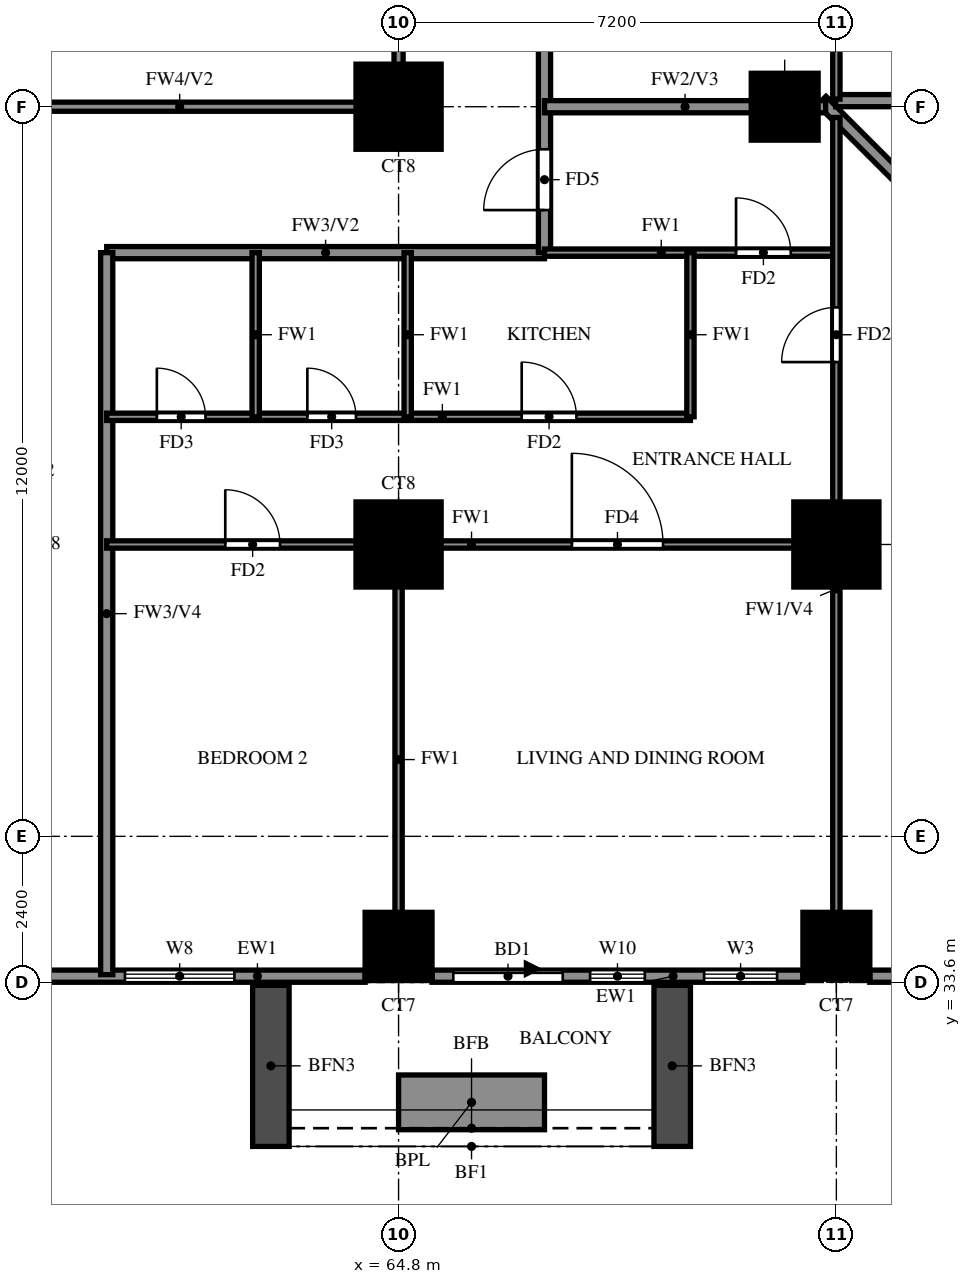
"""IFC4 building model, lengths in metres.
Left out: names, types, materials, properties, quantities, classifications, styles, units other than length and angle.
Written with IfcOpenShell. Run it as: python <this file> out.ifc"""

import sys

from ifc_helpers import new_model, si_unit, direction, frame, frame_2d, origin, origin_2d, place, context, subcontext, project, spatial, rectangle, extrude, source, transform, mapped, element, fill, save


model = new_model("IFC4")
c1 = context("Model", 3, precision=1e-05, world=origin(), true_north=direction((0.0, 1.0)))
c2 = subcontext(c1, "Body", "Model", "MODEL_VIEW")
j1 = project(units=[si_unit("LENGTHUNIT", "METRE"), si_unit("PLANEANGLEUNIT", "RADIAN")], contexts=[c1])
p1 = place(None, origin())
s1 = spatial("IfcSite", under=j1, at=p1, CompositionType="ELEMENT")
p2 = place(p1, origin())
s2 = spatial("IfcBuilding", under=s1, at=p2, CompositionType="ELEMENT")
p3 = place(p2, frame((0.0, 0.0, 41.0)))
s3 = spatial("IfcBuildingStorey", under=s2, at=p3, CompositionType="ELEMENT", Elevation=41.0)
m1 = source(origin(), c2, "Body", "SweptSolid", [
    extrude(rectangle(XDim=1.1, YDim=1.1, at=origin_2d()), origin(), (0.0, 0.0, 1.0), 3.18),
])
for number, where, z_axis, x_axis in (
    (1, (64.8, 34.2, 0.0), (0.0, 0.0, 1.0), (1.0, 0.0, 0.0)),
    (2, (72.0, 34.2, 0.0), (0.0, 0.0, 1.0), (1.0, 0.0, 0.0)),
):
    element("IfcColumn", number, at=place(p3, frame(where, z_axis=z_axis, x_axis=x_axis)), inside=s3, PredefinedType="COLUMN", context=c2, shape_type="MappedRepresentation", body=[
        mapped(m1, transform((0.0, 0.0, 0.0))),
    ])
m2 = source(origin(), c2, "Body", "SweptSolid", [
    extrude(rectangle(XDim=1.4, YDim=1.4, at=origin_2d()), origin(), (0.0, 0.0, 1.0), 3.18),
])
for number, where, z_axis, x_axis in (
    (3, (64.8, 40.8, 0.0), (0.0, 0.0, 1.0), (1.0, 0.0, 0.0)),
    (4, (72.0, 40.8, 0.0), (0.0, 0.0, 1.0), (1.0, 0.0, 0.0)),
    (5, (64.8, 48.0, 0.0), (0.0, 0.0, 1.0), (1.0, 0.0, 0.0)),
):
    element("IfcColumn", number, at=place(p3, frame(where, z_axis=z_axis, x_axis=x_axis)), inside=s3, PredefinedType="COLUMN", context=c2, shape_type="MappedRepresentation", body=[
        mapped(m2, transform((0.0, 0.0, 0.0))),
    ])
p4 = place(p3, frame((71.15, 48.0, 0.0), z_axis=(0.0, 0.0, 1.0), x_axis=(1.0, 0.0, 0.0)))
e6 = element("IfcColumn", 6, at=p4, inside=s3, PredefinedType="COLUMN", context=c2, shape_type="MappedRepresentation", body=[
    mapped(m1, transform((0.0, 0.0, 0.0))),
])
p5 = place(p3, frame((78.74, 41.118, 0.0), z_axis=(0.0, 0.0, 1.0), x_axis=(-0.707106781187, 0.707106781187, 0.0)))
e7 = element("IfcWall", 7, at=p5, inside=s3, PredefinedType="SOLIDWALL", context=c2, shape_type="SweptSolid", body=[
    extrude(rectangle(XDim=9.874, YDim=0.2, at=frame_2d((4.937, 0.0))), origin(), (0.0, 0.0, 1.0), 3.18),
])
p6 = place(p3, frame((71.989, 48.1, 0.0), z_axis=(0.0, 0.0, 1.0), x_axis=(1.0, 0.0, 0.0)))
e8 = element("IfcWall", 8, at=p6, inside=s3, PredefinedType="SOLIDWALL", context=c2, shape_type="SweptSolid", body=[
    extrude(rectangle(XDim=6.511, YDim=0.2, at=frame_2d((3.256, 0.0))), origin(), (0.0, 0.0, 1.0), 3.18),
])
p7 = place(p6, frame((2.206, 0.0, 1.5)))
e9 = element("IfcOpeningElement", 9, at=p7, cuts=e8, PredefinedType="OPENING", context=c2, shape_type="SweptSolid", body=[
    extrude(rectangle(XDim=0.9, YDim=0.9, at=frame_2d((0.45, 0.45))), frame((0.0, 0.11, 0.0), z_axis=(0.0, -1.0, 0.0), x_axis=(1.0, 0.0, 0.0)), (0.0, 0.0, 1.0), 0.22),
])
p8 = place(p3, frame((58.8, 33.7, 0.0), z_axis=(0.0, 0.0, 1.0), x_axis=(1.0, 0.0, 0.0)))
e10 = element("IfcWall", 10, at=p8, inside=s3, PredefinedType="SOLIDWALL", context=c2, shape_type="SweptSolid", body=[
    extrude(rectangle(XDim=5.45, YDim=0.2, at=frame_2d((2.725, 0.0))), origin(), (0.0, 0.0, 1.0), 3.18),
])
p9 = place(p8, frame((1.5, 0.0, 0.6)))
e11 = element("IfcOpeningElement", 11, at=p9, cuts=e10, PredefinedType="OPENING", context=c2, shape_type="SweptSolid", body=[
    extrude(rectangle(XDim=1.8, YDim=2.4, at=frame_2d((0.9, 1.2))), frame((0.0, 0.11, 0.0), z_axis=(0.0, -1.0, 0.0), x_axis=(1.0, 0.0, 0.0)), (0.0, 0.0, 1.0), 0.22),
])
p10 = place(p3, frame((65.35, 33.7, 0.0), z_axis=(0.0, 0.0, 1.0), x_axis=(1.0, 0.0, 0.0)))
e12 = element("IfcWall", 12, at=p10, inside=s3, PredefinedType="SOLIDWALL", context=c2, shape_type="SweptSolid", body=[
    extrude(rectangle(XDim=6.1, YDim=0.2, at=frame_2d((3.05, 0.0))), origin(), (0.0, 0.0, 1.0), 3.18),
])
p11 = place(p10, frame((0.35, 0.0, 0.0)))
e13 = element("IfcOpeningElement", 13, at=p11, cuts=e12, PredefinedType="OPENING", context=c2, shape_type="SweptSolid", body=[
    extrude(rectangle(XDim=1.8, YDim=2.4, at=frame_2d((0.9, 1.2))), frame((0.0, 0.11, 0.0), z_axis=(0.0, -1.0, 0.0), x_axis=(1.0, 0.0, 0.0)), (0.0, 0.0, 1.0), 0.22),
])
p12 = place(p10, frame((2.6, 0.0, 0.6)))
e14 = element("IfcOpeningElement", 14, at=p12, cuts=e12, PredefinedType="OPENING", context=c2, shape_type="SweptSolid", body=[
    extrude(rectangle(XDim=0.9, YDim=2.4, at=frame_2d((0.45, 1.2))), frame((0.0, 0.11, 0.0), z_axis=(0.0, -1.0, 0.0), x_axis=(1.0, 0.0, 0.0)), (0.0, 0.0, 1.0), 0.22),
])
p13 = place(p10, frame((4.475, 0.0, 0.6)))
e15 = element("IfcOpeningElement", 15, at=p13, cuts=e12, PredefinedType="OPENING", context=c2, shape_type="SweptSolid", body=[
    extrude(rectangle(XDim=1.2, YDim=2.4, at=frame_2d((0.6, 1.2))), frame((0.0, 0.11, 0.0), z_axis=(0.0, -1.0, 0.0), x_axis=(1.0, 0.0, 0.0)), (0.0, 0.0, 1.0), 0.22),
])
p14 = place(p3, frame((72.55, 33.7, 0.0), z_axis=(0.0, 0.0, 1.0), x_axis=(1.0, 0.0, 0.0)))
e16 = element("IfcWall", 16, at=p14, inside=s3, PredefinedType="SOLIDWALL", context=c2, shape_type="SweptSolid", body=[
    extrude(rectangle(XDim=10.85, YDim=0.2, at=frame_2d((5.425, 0.0))), origin(), (0.0, 0.0, 1.0), 3.18),
])
p15 = place(p14, frame((5.75, 0.0, 0.0)))
e17 = element("IfcOpeningElement", 17, at=p15, cuts=e16, PredefinedType="OPENING", context=c2, shape_type="SweptSolid", body=[
    extrude(rectangle(XDim=1.8, YDim=2.4, at=frame_2d((0.9, 1.2))), frame((0.0, 0.11, 0.0), z_axis=(0.0, -1.0, 0.0), x_axis=(1.0, 0.0, 0.0)), (0.0, 0.0, 1.0), 0.22),
])
p16 = place(p14, frame((1.025, 0.0, 0.6)))
e18 = element("IfcOpeningElement", 18, at=p16, cuts=e16, PredefinedType="OPENING", context=c2, shape_type="SweptSolid", body=[
    extrude(rectangle(XDim=2.4, YDim=2.4, at=frame_2d((1.2, 1.2))), frame((0.0, 0.11, 0.0), z_axis=(0.0, -1.0, 0.0), x_axis=(1.0, 0.0, 0.0)), (0.0, 0.0, 1.0), 0.22),
])
p17 = place(p14, frame((8.35, 0.0, 0.6)))
e19 = element("IfcOpeningElement", 19, at=p17, cuts=e16, PredefinedType="OPENING", context=c2, shape_type="SweptSolid", body=[
    extrude(rectangle(XDim=1.8, YDim=2.4, at=frame_2d((0.9, 1.2))), frame((0.0, 0.11, 0.0), z_axis=(0.0, -1.0, 0.0), x_axis=(1.0, 0.0, 0.0)), (0.0, 0.0, 1.0), 0.22),
])
for number, where, z_axis, x_axis in (
    (20, (62.7, 33.55, 0.0), (0.0, 0.0, 1.0), (0.0, -1.0, 0.0)),
    (21, (69.3, 33.55, 0.0), (0.0, 0.0, 1.0), (0.0, -1.0, 0.0)),
):
    element("IfcWall", number, at=place(p3, frame(where, z_axis=z_axis, x_axis=x_axis)), inside=s3, PredefinedType="SOLIDWALL", context=c2, shape_type="SweptSolid", body=[
        extrude(rectangle(XDim=2.65, YDim=0.6, at=frame_2d((1.325, 0.0))), origin(), (0.0, 0.0, 1.0), 2.85),
    ])
p18 = place(p3, frame((64.8, 31.625, 0.0), z_axis=(0.0, 0.0, 1.0), x_axis=(1.0, 0.0, 0.0)))
e22 = element("IfcWall", 22, at=p18, inside=s3, PredefinedType="SOLIDWALL", context=c2, shape_type="SweptSolid", body=[
    extrude(rectangle(XDim=2.4, YDim=0.9, at=frame_2d((1.2, 0.0))), origin(), (0.0, 0.0, 1.0), 0.9),
])
p19 = place(p3, frame((60.0, 45.6, 0.0), z_axis=(0.0, 0.0, 1.0), x_axis=(1.0, 0.0, 0.0)))
e23 = element("IfcWall", 23, at=p19, inside=s3, PredefinedType="SOLIDWALL", context=c2, shape_type="SweptSolid", body=[
    extrude(rectangle(XDim=7.2, YDim=0.2, at=frame_2d((3.6, 0.0))), origin(), (0.0, 0.0, 1.0), 3.18),
])
p20 = place(p3, frame((60.0, 33.725, 0.0), z_axis=(0.0, 0.0, 1.0), x_axis=(0.0, 1.0, 0.0)))
e24 = element("IfcWall", 24, at=p20, inside=s3, PredefinedType="SOLIDWALL", context=c2, shape_type="SweptSolid", body=[
    extrude(rectangle(XDim=11.875, YDim=0.2, at=frame_2d((5.938, 0.0))), origin(), (0.0, 0.0, 1.0), 2.28),
])
p21 = place(p3, frame((67.2, 45.6, 0.0), z_axis=(0.0, 0.0, 1.0), x_axis=(0.0, 1.0, 0.0)))
e25 = element("IfcWall", 25, at=p21, inside=s3, PredefinedType="SOLIDWALL", context=c2, shape_type="SweptSolid", body=[
    extrude(rectangle(XDim=12.0, YDim=0.2, at=frame_2d((6.0, 0.0))), origin(), (0.0, 0.0, 1.0), 3.18),
])
p22 = place(p21, frame((10.3, 0.0, 0.0)))
e26 = element("IfcOpeningElement", 26, at=p22, cuts=e25, PredefinedType="OPENING", context=c2, shape_type="SweptSolid", body=[
    extrude(rectangle(XDim=1.0, YDim=2.1, at=frame_2d((0.5, 1.05))), frame((0.0, 0.11, 0.0), z_axis=(0.0, -1.0, 0.0), x_axis=(1.0, 0.0, 0.0)), (0.0, 0.0, 1.0), 0.22),
])
p23 = place(p21, frame((0.7, 0.0, 0.0)))
e27 = element("IfcOpeningElement", 27, at=p23, cuts=e25, PredefinedType="OPENING", context=c2, shape_type="SweptSolid", body=[
    extrude(rectangle(XDim=1.0, YDim=2.1, at=frame_2d((0.5, 1.05))), frame((0.0, 0.11, 0.0), z_axis=(0.0, -1.0, 0.0), x_axis=(1.0, 0.0, 0.0)), (0.0, 0.0, 1.0), 0.22),
])
p24 = place(p3, frame((67.2, 48.0, 0.0), z_axis=(0.0, 0.0, 1.0), x_axis=(1.0, 0.0, 0.0)))
e28 = element("IfcWall", 28, at=p24, inside=s3, PredefinedType="SOLIDWALL", context=c2, shape_type="SweptSolid", body=[
    extrude(rectangle(XDim=4.623, YDim=0.2, at=frame_2d((2.312, 0.0))), origin(), (0.0, 0.0, 1.0), 3.18),
])
p25 = place(p3, frame((60.0, 40.8, 0.0), z_axis=(0.0, 0.0, 1.0), x_axis=(1.0, 0.0, 0.0)))
e29 = element("IfcWall", 29, at=p25, inside=s3, PredefinedType="PARTITIONING", context=c2, shape_type="SweptSolid", body=[
    extrude(rectangle(XDim=12.0, YDim=0.12, at=frame_2d((6.0, 0.0))), origin(), (0.0, 0.0, 1.0), 3.18),
])
p26 = place(p25, frame((7.65, 0.0, 0.0)))
e30 = element("IfcOpeningElement", 30, at=p26, cuts=e29, PredefinedType="OPENING", context=c2, shape_type="SweptSolid", body=[
    extrude(rectangle(XDim=1.5, YDim=2.1, at=frame_2d((0.75, 1.05))), frame((0.0, 0.07, 0.0), z_axis=(0.0, -1.0, 0.0), x_axis=(1.0, 0.0, 0.0)), (0.0, 0.0, 1.0), 0.14),
])
p27 = place(p25, frame((1.95, 0.0, 0.0)))
e31 = element("IfcOpeningElement", 31, at=p27, cuts=e29, PredefinedType="OPENING", context=c2, shape_type="SweptSolid", body=[
    extrude(rectangle(XDim=0.9, YDim=2.1, at=frame_2d((0.45, 1.05))), frame((0.0, 0.07, 0.0), z_axis=(0.0, -1.0, 0.0), x_axis=(1.0, 0.0, 0.0)), (0.0, 0.0, 1.0), 0.14),
])
p28 = place(p3, frame((60.0, 42.9, 0.0), z_axis=(0.0, 0.0, 1.0), x_axis=(1.0, 0.0, 0.0)))
e32 = element("IfcWall", 32, at=p28, inside=s3, PredefinedType="PARTITIONING", context=c2, shape_type="SweptSolid", body=[
    extrude(rectangle(XDim=9.6, YDim=0.12, at=frame_2d((4.8, 0.0))), origin(), (0.0, 0.0, 1.0), 3.18),
])
p29 = place(p28, frame((6.825, 0.0, 0.0)))
e33 = element("IfcOpeningElement", 33, at=p29, cuts=e32, PredefinedType="OPENING", context=c2, shape_type="SweptSolid", body=[
    extrude(rectangle(XDim=0.9, YDim=2.1, at=frame_2d((0.45, 1.05))), frame((0.0, 0.07, 0.0), z_axis=(0.0, -1.0, 0.0), x_axis=(1.0, 0.0, 0.0)), (0.0, 0.0, 1.0), 0.14),
])
p30 = place(p28, frame((3.3, 0.0, 0.0)))
e34 = element("IfcOpeningElement", 34, at=p30, cuts=e32, PredefinedType="OPENING", context=c2, shape_type="SweptSolid", body=[
    extrude(rectangle(XDim=0.8, YDim=2.1, at=frame_2d((0.4, 1.05))), frame((0.0, 0.07, 0.0), z_axis=(0.0, -1.0, 0.0), x_axis=(1.0, 0.0, 0.0)), (0.0, 0.0, 1.0), 0.14),
])
p31 = place(p28, frame((0.825, 0.0, 0.0)))
e35 = element("IfcOpeningElement", 35, at=p31, cuts=e32, PredefinedType="OPENING", context=c2, shape_type="SweptSolid", body=[
    extrude(rectangle(XDim=0.8, YDim=2.1, at=frame_2d((0.4, 1.05))), frame((0.0, 0.07, 0.0), z_axis=(0.0, -1.0, 0.0), x_axis=(1.0, 0.0, 0.0)), (0.0, 0.0, 1.0), 0.14),
])
p32 = place(p3, frame((67.2, 45.6, 0.0), z_axis=(0.0, 0.0, 1.0), x_axis=(1.0, 0.0, 0.0)))
e36 = element("IfcWall", 36, at=p32, inside=s3, PredefinedType="PARTITIONING", context=c2, shape_type="SweptSolid", body=[
    extrude(rectangle(XDim=4.8, YDim=0.12, at=frame_2d((2.4, 0.0))), origin(), (0.0, 0.0, 1.0), 3.18),
])
p33 = place(p32, frame((3.15, 0.0, 0.0)))
e37 = element("IfcOpeningElement", 37, at=p33, cuts=e36, PredefinedType="OPENING", context=c2, shape_type="SweptSolid", body=[
    extrude(rectangle(XDim=0.9, YDim=2.1, at=frame_2d((0.45, 1.05))), frame((0.0, 0.07, 0.0), z_axis=(0.0, -1.0, 0.0), x_axis=(1.0, 0.0, 0.0)), (0.0, 0.0, 1.0), 0.14),
])
p34 = place(p3, frame((62.45, 42.9, 0.0), z_axis=(0.0, 0.0, 1.0), x_axis=(0.0, 1.0, 0.0)))
e38 = element("IfcWall", 38, at=p34, inside=s3, PredefinedType="PARTITIONING", context=c2, shape_type="SweptSolid", body=[
    extrude(rectangle(XDim=2.7, YDim=0.12, at=frame_2d((1.35, 0.0))), origin(), (0.0, 0.0, 1.0), 3.18),
])
p35 = place(p3, frame((64.8, 33.725, 0.0), z_axis=(0.0, 0.0, 1.0), x_axis=(0.0, 1.0, 0.0)))
e39 = element("IfcWall", 39, at=p35, inside=s3, PredefinedType="PARTITIONING", context=c2, shape_type="SweptSolid", body=[
    extrude(rectangle(XDim=7.075, YDim=0.12, at=frame_2d((3.538, 0.0))), origin(), (0.0, 0.0, 1.0), 3.18),
])
for number, where, z_axis, x_axis in (
    (40, (64.95, 42.9, 0.0), (0.0, 0.0, 1.0), (0.0, 1.0, 0.0)),
    (41, (69.6, 42.9, 0.0), (0.0, 0.0, 1.0), (0.0, 1.0, 0.0)),
):
    element("IfcWall", number, at=place(p3, frame(where, z_axis=z_axis, x_axis=x_axis)), inside=s3, PredefinedType="PARTITIONING", context=c2, shape_type="SweptSolid", body=[
        extrude(rectangle(XDim=2.7, YDim=0.12, at=frame_2d((1.35, 0.0))), origin(), (0.0, 0.0, 1.0), 3.18),
    ])
p36 = place(p3, frame((72.0, 33.725, 0.0), z_axis=(0.0, 0.0, 1.0), x_axis=(0.0, 1.0, 0.0)))
e42 = element("IfcWall", 42, at=p36, inside=s3, PredefinedType="PARTITIONING", context=c2, shape_type="SweptSolid", body=[
    extrude(rectangle(XDim=14.098, YDim=0.12, at=frame_2d((7.049, 0.0))), origin(), (0.0, 0.0, 1.0), 2.28),
])
p37 = place(p36, frame((10.075, 0.0, 0.0)))
e43 = element("IfcOpeningElement", 43, at=p37, cuts=e42, PredefinedType="OPENING", context=c2, shape_type="SweptSolid", body=[
    extrude(rectangle(XDim=0.9, YDim=2.1, at=frame_2d((0.45, 1.05))), frame((0.0, 0.07, 0.0), z_axis=(0.0, -1.0, 0.0), x_axis=(1.0, 0.0, 0.0)), (0.0, 0.0, 1.0), 0.14),
])
p38 = place(p3, frame((72.0, 48.125, 0.0), z_axis=(0.0, 0.0, 1.0), x_axis=(0.0, 1.0, 0.0)))
e44 = element("IfcWall", 44, at=p38, inside=s3, PredefinedType="PARTITIONING", context=c2, shape_type="SweptSolid", body=[
    extrude(rectangle(XDim=7.075, YDim=0.12, at=frame_2d((3.538, 0.0))), origin(), (0.0, 0.0, 1.0), 3.18),
])
p39 = place(p3, frame((57.6, 48.0, 0.0), z_axis=(0.0, 0.0, 1.0), x_axis=(1.0, 0.0, 0.0)))
e45 = element("IfcWall", 45, at=p39, inside=s3, PredefinedType="SOLIDWALL", context=c2, shape_type="SweptSolid", body=[
    extrude(rectangle(XDim=7.2, YDim=0.15, at=frame_2d((3.6, 0.0))), origin(), (0.0, 0.0, 1.0), 2.28),
])
p40 = place(p3, frame((64.8, 48.0, 0.0), z_axis=(0.0, 0.0, 1.0), x_axis=(0.0, 1.0, 0.0)))
e46 = element("IfcWall", 46, at=p40, inside=s3, PredefinedType="SOLIDWALL", context=c2, shape_type="SweptSolid", body=[
    extrude(rectangle(XDim=14.4, YDim=0.15, at=frame_2d((7.2, 0.0))), origin(), (0.0, 0.0, 1.0), 2.28),
])
p41 = place(p9, origin())
e47 = element("IfcWindow", 47, at=p41, inside=s3, PartitioningType="DOUBLE_PANEL_VERTICAL", PredefinedType="WINDOW", context=c2, shape_type="SweptSolid", body=[
    extrude(rectangle(XDim=1.8, YDim=2.4, at=frame_2d((0.9, 1.2))), frame((0.0, 0.03, 0.0), z_axis=(0.0, -1.0, 0.0), x_axis=(1.0, 0.0, 0.0)), (0.0, 0.0, 1.0), 0.06),
])
fill(e11, e47)
p42 = place(p11, origin())
e48 = element("IfcDoor", 48, at=p42, inside=s3, OperationType="DOUBLE_DOOR_SLIDING", PredefinedType="DOOR", context=c2, shape_type="SweptSolid", body=[
    extrude(rectangle(XDim=1.8, YDim=2.4, at=frame_2d((0.9, 1.2))), frame((0.0, 0.025, 0.0), z_axis=(0.0, -1.0, 0.0), x_axis=(1.0, 0.0, 0.0)), (0.0, 0.0, 1.0), 0.05),
])
fill(e13, e48)
p43 = place(p12, origin())
e49 = element("IfcWindow", 49, at=p43, inside=s3, PartitioningType="SINGLE_PANEL", PredefinedType="WINDOW", context=c2, shape_type="SweptSolid", body=[
    extrude(rectangle(XDim=0.9, YDim=2.4, at=frame_2d((0.45, 1.2))), frame((0.0, 0.03, 0.0), z_axis=(0.0, -1.0, 0.0), x_axis=(1.0, 0.0, 0.0)), (0.0, 0.0, 1.0), 0.06),
])
fill(e14, e49)
p44 = place(p13, origin())
e50 = element("IfcWindow", 50, at=p44, inside=s3, PartitioningType="SINGLE_PANEL", PredefinedType="WINDOW", context=c2, shape_type="SweptSolid", body=[
    extrude(rectangle(XDim=1.2, YDim=2.4, at=frame_2d((0.6, 1.2))), frame((0.0, 0.03, 0.0), z_axis=(0.0, -1.0, 0.0), x_axis=(1.0, 0.0, 0.0)), (0.0, 0.0, 1.0), 0.06),
])
fill(e15, e50)
p45 = place(p33, origin())
e51 = element("IfcDoor", 51, at=p45, inside=s3, OperationType="SINGLE_SWING_LEFT", PredefinedType="DOOR", context=c2, shape_type="SweptSolid", body=[
    extrude(rectangle(XDim=0.9, YDim=2.1, at=frame_2d((0.45, 1.05))), frame((0.0, 0.025, 0.0), z_axis=(0.0, -1.0, 0.0), x_axis=(1.0, 0.0, 0.0)), (0.0, 0.0, 1.0), 0.05),
])
fill(e37, e51)
p46 = place(p23, origin())
e52 = element("IfcDoor", 52, at=p46, inside=s3, OperationType="SINGLE_SWING_RIGHT", PredefinedType="DOOR", context=c2, shape_type="SweptSolid", body=[
    extrude(rectangle(XDim=1.0, YDim=2.1, at=frame_2d((0.5, 1.05))), frame((0.0, 0.025, 0.0), z_axis=(0.0, -1.0, 0.0), x_axis=(1.0, 0.0, 0.0)), (0.0, 0.0, 1.0), 0.05),
])
fill(e27, e52)
p47 = place(p26, origin())
e53 = element("IfcDoor", 53, at=p47, inside=s3, OperationType="SINGLE_SWING_LEFT", PredefinedType="DOOR", context=c2, shape_type="SweptSolid", body=[
    extrude(rectangle(XDim=1.5, YDim=2.1, at=frame_2d((0.75, 1.05))), frame((0.0, 0.025, 0.0), z_axis=(0.0, -1.0, 0.0), x_axis=(1.0, 0.0, 0.0)), (0.0, 0.0, 1.0), 0.05),
])
fill(e30, e53)
p48 = place(p27, origin())
e54 = element("IfcDoor", 54, at=p48, inside=s3, OperationType="SINGLE_SWING_LEFT", PredefinedType="DOOR", context=c2, shape_type="SweptSolid", body=[
    extrude(rectangle(XDim=0.9, YDim=2.1, at=frame_2d((0.45, 1.05))), frame((0.0, 0.025, 0.0), z_axis=(0.0, -1.0, 0.0), x_axis=(1.0, 0.0, 0.0)), (0.0, 0.0, 1.0), 0.05),
])
fill(e31, e54)
p49 = place(p29, origin())
e55 = element("IfcDoor", 55, at=p49, inside=s3, OperationType="SINGLE_SWING_RIGHT", PredefinedType="DOOR", context=c2, shape_type="SweptSolid", body=[
    extrude(rectangle(XDim=0.9, YDim=2.1, at=frame_2d((0.45, 1.05))), frame((0.0, 0.025, 0.0), z_axis=(0.0, -1.0, 0.0), x_axis=(1.0, 0.0, 0.0)), (0.0, 0.0, 1.0), 0.05),
])
fill(e33, e55)
p50 = place(p30, origin())
e56 = element("IfcDoor", 56, at=p50, inside=s3, OperationType="SINGLE_SWING_LEFT", PredefinedType="DOOR", context=c2, shape_type="SweptSolid", body=[
    extrude(rectangle(XDim=0.8, YDim=2.1, at=frame_2d((0.4, 1.05))), frame((0.0, 0.025, 0.0), z_axis=(0.0, -1.0, 0.0), x_axis=(1.0, 0.0, 0.0)), (0.0, 0.0, 1.0), 0.05),
])
fill(e34, e56)
p51 = place(p31, origin())
e57 = element("IfcDoor", 57, at=p51, inside=s3, OperationType="SINGLE_SWING_LEFT", PredefinedType="DOOR", context=c2, shape_type="SweptSolid", body=[
    extrude(rectangle(XDim=0.8, YDim=2.1, at=frame_2d((0.4, 1.05))), frame((0.0, 0.025, 0.0), z_axis=(0.0, -1.0, 0.0), x_axis=(1.0, 0.0, 0.0)), (0.0, 0.0, 1.0), 0.05),
])
fill(e35, e57)
p52 = place(p37, origin())
e58 = element("IfcDoor", 58, at=p52, inside=s3, OperationType="SINGLE_SWING_RIGHT", PredefinedType="DOOR", context=c2, shape_type="SweptSolid", body=[
    extrude(rectangle(XDim=0.9, YDim=2.1, at=frame_2d((0.45, 1.05))), frame((0.0, 0.025, 0.0), z_axis=(0.0, -1.0, 0.0), x_axis=(1.0, 0.0, 0.0)), (0.0, 0.0, 1.0), 0.05),
])
fill(e43, e58)
save(model, sys.argv[1])
